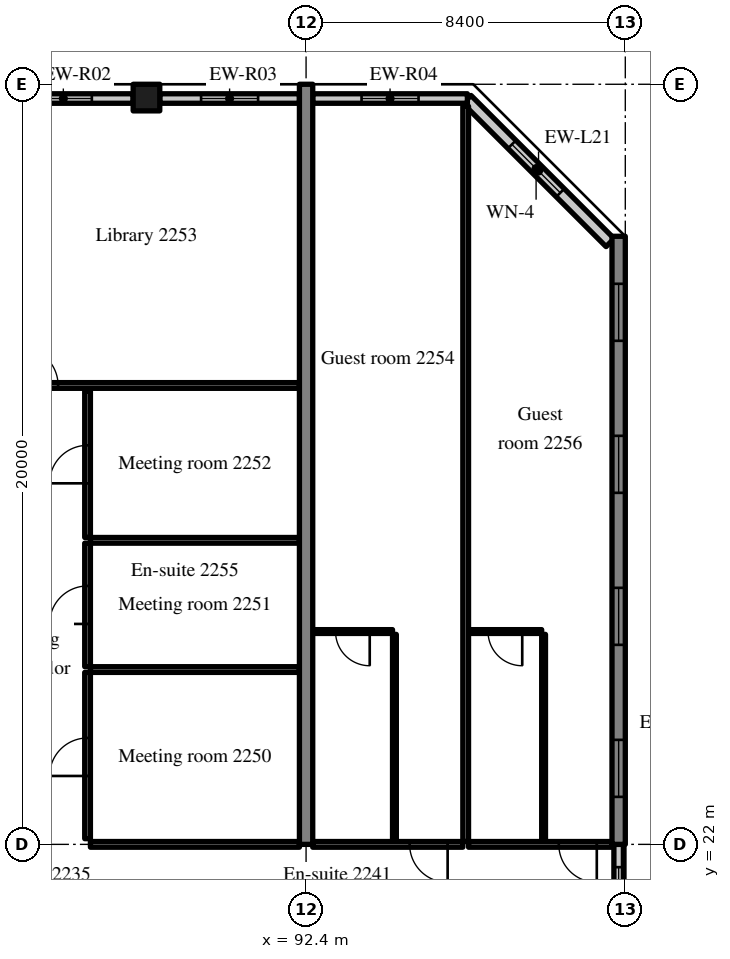
"""IFC4 building model, lengths in metres.
Left out: names, types, materials, properties, quantities, classifications, styles, units other than length and angle.
Written with IfcOpenShell. Run it as: python <this file> out.ifc"""

import sys

from ifc_helpers import new_model, si_unit, direction, frame, frame_2d, origin, origin_2d, place, context, subcontext, project, spatial, rectangle, extrude, source, transform, mapped, element, fill, save


model = new_model("IFC4")
c1 = context("Model", 3, precision=1e-05, world=origin(), true_north=direction((0.0, 1.0)))
c2 = subcontext(c1, "Body", "Model", "MODEL_VIEW")
j1 = project(units=[si_unit("LENGTHUNIT", "METRE"), si_unit("PLANEANGLEUNIT", "RADIAN")], contexts=[c1])
p1 = place(None, origin())
s1 = spatial("IfcSite", under=j1, at=p1, CompositionType="ELEMENT")
p2 = place(p1, origin())
s2 = spatial("IfcBuilding", under=s1, at=p2, CompositionType="ELEMENT")
p3 = place(p2, frame((0.0, 0.0, 95.2)))
s3 = spatial("IfcBuildingStorey", under=s2, at=p3, CompositionType="ELEMENT", Elevation=95.2)
m1 = source(origin(), c2, "Body", "SweptSolid", [
    extrude(rectangle(XDim=20.0, YDim=0.35, at=frame_2d((10.0, 0.0))), origin(), (0.0, 0.0, 1.0), 3.52),
])
p4 = place(p3, frame((92.4, 22.0, 0.0), z_axis=(0.0, 0.0, 1.0), x_axis=(0.0, 1.0, 0.0)))
e1 = element("IfcWall", 1, at=p4, inside=s3, PredefinedType="SHEAR", context=c2, shape_type="MappedRepresentation", body=[
    mapped(m1, transform((0.0, 0.0, 0.0), scale=1.0)),
])
m2 = source(origin(), c2, "Body", "SweptSolid", [
    extrude(rectangle(XDim=16.0, YDim=0.35, at=frame_2d((8.0, 0.0))), origin(), (0.0, 0.0, 1.0), 3.52),
])
p5 = place(p3, frame((100.625, 22.0, 0.0), z_axis=(0.0, 0.0, 1.0), x_axis=(0.0, 1.0, 0.0)))
e2 = element("IfcWall", 2, at=p5, inside=s3, PredefinedType="SHEAR", context=c2, shape_type="MappedRepresentation", body=[
    mapped(m2, transform((0.0, 0.0, 0.0), scale=1.0)),
])
m3 = source(origin(), c2, "Body", "SweptSolid", [
    extrude(rectangle(XDim=1.5, YDim=1.5, at=frame_2d((0.75, 0.75))), frame((0.0, 0.185, 0.0), z_axis=(0.0, -1.0, 0.0), x_axis=(1.0, 0.0, 0.0)), (0.0, 0.0, 1.0), 0.37),
])
p6 = place(p5, frame((1.25, 0.0, 0.9)))
e3 = element("IfcOpeningElement", 3, at=p6, cuts=e2, PredefinedType="OPENING", context=c2, shape_type="MappedRepresentation", body=[
    mapped(m3, transform((0.0, 0.0, 0.0), scale=1.0)),
])
p7 = place(p5, frame((5.25, 0.0, 0.9)))
e4 = element("IfcOpeningElement", 4, at=p7, cuts=e2, PredefinedType="OPENING", context=c2, shape_type="MappedRepresentation", body=[
    mapped(m3, transform((0.0, 0.0, 0.0), scale=1.0)),
])
p8 = place(p5, frame((9.25, 0.0, 0.9)))
e5 = element("IfcOpeningElement", 5, at=p8, cuts=e2, PredefinedType="OPENING", context=c2, shape_type="MappedRepresentation", body=[
    mapped(m3, transform((0.0, 0.0, 0.0), scale=1.0)),
])
p9 = place(p5, frame((13.25, 0.0, 0.9)))
e6 = element("IfcOpeningElement", 6, at=p9, cuts=e2, PredefinedType="OPENING", context=c2, shape_type="MappedRepresentation", body=[
    mapped(m3, transform((0.0, 0.0, 0.0), scale=1.0)),
])
m4 = source(origin(), c2, "Body", "SweptSolid", [
    extrude(rectangle(XDim=0.7, YDim=0.7, at=origin_2d()), origin(), (0.0, 0.0, 1.0), 3.52),
])
p10 = place(p3, frame((88.2, 41.65, 0.0), z_axis=(0.0, 0.0, 1.0), x_axis=(1.0, 0.0, 0.0)))
e7 = element("IfcColumn", 7, at=p10, inside=s3, PredefinedType="COLUMN", context=c2, shape_type="MappedRepresentation", body=[
    mapped(m4, transform((0.0, 0.0, 0.0), scale=1.0)),
])
m5 = source(origin(), c2, "Body", "SweptSolid", [
    extrude(rectangle(XDim=5.326, YDim=0.3, at=frame_2d((2.663, 0.0))), origin(), (0.0, 0.0, 1.0), 3.52),
])
p11 = place(p3, frame((100.4, 37.834, 0.0), z_axis=(0.0, 0.0, 1.0), x_axis=(-0.707083859269, 0.707129702361, 0.0)))
e8 = element("IfcWall", 8, at=p11, inside=s3, PredefinedType="SOLIDWALL", context=c2, shape_type="MappedRepresentation", body=[
    mapped(m5, transform((0.0, 0.0, 0.0), scale=1.0)),
])
m6 = source(origin(), c2, "Body", "SweptSolid", [
    extrude(rectangle(XDim=1.8, YDim=1.5, at=frame_2d((0.9, 0.75))), frame((0.0, 0.16, 0.0), z_axis=(0.0, -1.0, 0.0), x_axis=(1.0, 0.0, 0.0)), (0.0, 0.0, 1.0), 0.32),
])
p12 = place(p11, frame((1.854, 0.0, 0.9)))
e9 = element("IfcOpeningElement", 9, at=p12, cuts=e8, PredefinedType="OPENING", context=c2, shape_type="MappedRepresentation", body=[
    mapped(m6, transform((0.0, 0.0, 0.0), scale=1.0)),
])
m7 = source(origin(), c2, "Body", "SweptSolid", [
    extrude(rectangle(XDim=3.675, YDim=0.25, at=frame_2d((1.837, 0.0))), origin(), (0.0, 0.0, 1.0), 2.82),
])
p13 = place(p3, frame((87.85, 41.625, 0.0), z_axis=(0.0, 0.0, 1.0), x_axis=(-1.0, 0.0, 0.0)))
e10 = element("IfcWall", 10, at=p13, inside=s3, PredefinedType="SOLIDWALL", context=c2, shape_type="MappedRepresentation", body=[
    mapped(m7, transform((0.0, 0.0, 0.0), scale=1.0)),
])
m8 = source(origin(), c2, "Body", "SweptSolid", [
    extrude(rectangle(XDim=1.5, YDim=1.5, at=frame_2d((0.75, 0.75))), frame((0.0, 0.135, 0.0), z_axis=(0.0, -1.0, 0.0), x_axis=(1.0, 0.0, 0.0)), (0.0, 0.0, 1.0), 0.27),
])
p14 = place(p13, frame((1.087, 0.0, 0.9)))
e11 = element("IfcOpeningElement", 11, at=p14, cuts=e10, PredefinedType="OPENING", context=c2, shape_type="MappedRepresentation", body=[
    mapped(m8, transform((0.0, 0.0, 0.0), scale=1.0)),
])
p15 = place(p3, frame((92.225, 41.625, 0.0), z_axis=(0.0, 0.0, 1.0), x_axis=(-1.0, 0.0, 0.0)))
e12 = element("IfcWall", 12, at=p15, inside=s3, PredefinedType="SOLIDWALL", context=c2, shape_type="MappedRepresentation", body=[
    mapped(m7, transform((0.0, 0.0, 0.0), scale=1.0)),
])
p16 = place(p15, frame((1.087, 0.0, 0.9)))
e13 = element("IfcOpeningElement", 13, at=p16, cuts=e12, PredefinedType="OPENING", context=c2, shape_type="MappedRepresentation", body=[
    mapped(m8, transform((0.0, 0.0, 0.0), scale=1.0)),
])
m9 = source(origin(), c2, "Body", "SweptSolid", [
    extrude(rectangle(XDim=4.07, YDim=0.25, at=frame_2d((2.035, 0.0))), origin(), (0.0, 0.0, 1.0), 2.82),
])
p17 = place(p3, frame((96.645, 41.625, 0.0), z_axis=(0.0, 0.0, 1.0), x_axis=(-1.0, 0.0, 0.0)))
e14 = element("IfcWall", 14, at=p17, inside=s3, PredefinedType="SOLIDWALL", context=c2, shape_type="MappedRepresentation", body=[
    mapped(m9, transform((0.0, 0.0, 0.0), scale=1.0)),
])
p18 = place(p17, frame((1.285, 0.0, 0.9)))
e15 = element("IfcOpeningElement", 15, at=p18, cuts=e14, PredefinedType="OPENING", context=c2, shape_type="MappedRepresentation", body=[
    mapped(m8, transform((0.0, 0.0, 0.0), scale=1.0)),
])
m10 = source(origin(), c2, "Body", "SweptSolid", [
    extrude(rectangle(XDim=2.4, YDim=0.25, at=frame_2d((1.2, 0.0))), origin(), (0.0, 0.0, 1.0), 2.62),
])
p19 = place(p3, frame((100.625, 19.6, 0.0), z_axis=(0.0, 0.0, 1.0), x_axis=(0.0, 1.0, 0.0)))
e16 = element("IfcWall", 16, at=p19, inside=s3, PredefinedType="SOLIDWALL", context=c2, shape_type="MappedRepresentation", body=[
    mapped(m10, transform((0.0, 0.0, 0.0), scale=1.0)),
])
m11 = source(origin(), c2, "Body", "SweptSolid", [
    extrude(rectangle(XDim=1.2, YDim=1.5, at=frame_2d((0.6, 0.75))), frame((0.0, 0.135, 0.0), z_axis=(0.0, -1.0, 0.0), x_axis=(1.0, 0.0, 0.0)), (0.0, 0.0, 1.0), 0.27),
])
p20 = place(p19, frame((0.6, 0.0, 0.9)))
e17 = element("IfcOpeningElement", 17, at=p20, cuts=e16, PredefinedType="OPENING", context=c2, shape_type="MappedRepresentation", body=[
    mapped(m11, transform((0.0, 0.0, 0.0), scale=1.0)),
])
m12 = source(origin(), c2, "Body", "SweptSolid", [
    extrude(rectangle(XDim=5.5, YDim=0.15, at=frame_2d((2.75, 0.0))), origin(), (0.0, 0.0, 1.0), 2.82),
])
p21 = place(p3, frame((86.725, 22.0, 0.0), z_axis=(0.0, 0.0, 1.0), x_axis=(1.0, 0.0, 0.0)))
e18 = element("IfcWall", 18, at=p21, inside=s3, PredefinedType="PARTITIONING", context=c2, shape_type="MappedRepresentation", body=[
    mapped(m12, transform((0.0, 0.0, 0.0), scale=1.0)),
])
m13 = source(origin(), c2, "Body", "SweptSolid", [
    extrude(rectangle(XDim=4.375, YDim=0.15, at=frame_2d((2.188, 0.0))), origin(), (0.0, 0.0, 1.0), 3.52),
])
p22 = place(p3, frame((86.65, 22.15, 0.0), z_axis=(0.0, 0.0, 1.0), x_axis=(0.0, 1.0, 0.0)))
e19 = element("IfcWall", 19, at=p22, inside=s3, PredefinedType="PARTITIONING", context=c2, shape_type="MappedRepresentation", body=[
    mapped(m13, transform((0.0, 0.0, 0.0), scale=1.0)),
])
m14 = source(origin(), c2, "Body", "SweptSolid", [
    extrude(rectangle(XDim=1.0, YDim=2.1, at=frame_2d((0.5, 1.05))), frame((0.0, 0.085, 0.0), z_axis=(0.0, -1.0, 0.0), x_axis=(1.0, 0.0, 0.0)), (0.0, 0.0, 1.0), 0.17),
])
p23 = place(p22, frame((1.65, 0.0, 0.0)))
e20 = element("IfcOpeningElement", 20, at=p23, cuts=e19, PredefinedType="OPENING", context=c2, shape_type="MappedRepresentation", body=[
    mapped(m14, transform((0.0, 0.0, 0.0), scale=1.0)),
])
m15 = source(origin(), c2, "Body", "SweptSolid", [
    extrude(rectangle(XDim=5.5, YDim=0.15, at=frame_2d((2.75, 0.0))), origin(), (0.0, 0.0, 1.0), 3.52),
])
p24 = place(p3, frame((86.725, 26.6, 0.0), z_axis=(0.0, 0.0, 1.0), x_axis=(1.0, 0.0, 0.0)))
e21 = element("IfcWall", 21, at=p24, inside=s3, PredefinedType="PARTITIONING", context=c2, shape_type="MappedRepresentation", body=[
    mapped(m15, transform((0.0, 0.0, 0.0), scale=1.0)),
])
m16 = source(origin(), c2, "Body", "SweptSolid", [
    extrude(rectangle(XDim=3.25, YDim=0.15, at=frame_2d((1.625, 0.0))), origin(), (0.0, 0.0, 1.0), 3.52),
])
p25 = place(p3, frame((86.65, 26.675, 0.0), z_axis=(0.0, 0.0, 1.0), x_axis=(0.0, 1.0, 0.0)))
e22 = element("IfcWall", 22, at=p25, inside=s3, PredefinedType="PARTITIONING", context=c2, shape_type="MappedRepresentation", body=[
    mapped(m16, transform((0.0, 0.0, 0.0), scale=1.0)),
])
p26 = place(p25, frame((1.125, 0.0, 0.0)))
e23 = element("IfcOpeningElement", 23, at=p26, cuts=e22, PredefinedType="OPENING", context=c2, shape_type="MappedRepresentation", body=[
    mapped(m14, transform((0.0, 0.0, 0.0), scale=1.0)),
])
p27 = place(p3, frame((86.725, 30.0, 0.0), z_axis=(0.0, 0.0, 1.0), x_axis=(1.0, 0.0, 0.0)))
e24 = element("IfcWall", 24, at=p27, inside=s3, PredefinedType="PARTITIONING", context=c2, shape_type="MappedRepresentation", body=[
    mapped(m15, transform((0.0, 0.0, 0.0), scale=1.0)),
])
m17 = source(origin(), c2, "Body", "SweptSolid", [
    extrude(rectangle(XDim=3.85, YDim=0.15, at=frame_2d((1.925, 0.0))), origin(), (0.0, 0.0, 1.0), 3.52),
])
p28 = place(p3, frame((86.65, 30.075, 0.0), z_axis=(0.0, 0.0, 1.0), x_axis=(0.0, 1.0, 0.0)))
e25 = element("IfcWall", 25, at=p28, inside=s3, PredefinedType="PARTITIONING", context=c2, shape_type="MappedRepresentation", body=[
    mapped(m17, transform((0.0, 0.0, 0.0), scale=1.0)),
])
p29 = place(p28, frame((1.425, 0.0, 0.0)))
e26 = element("IfcOpeningElement", 26, at=p29, cuts=e25, PredefinedType="OPENING", context=c2, shape_type="MappedRepresentation", body=[
    mapped(m14, transform((0.0, 0.0, 0.0), scale=1.0)),
])
m18 = source(origin(), c2, "Body", "SweptSolid", [
    extrude(rectangle(XDim=8.05, YDim=0.15, at=frame_2d((4.025, 0.0))), origin(), (0.0, 0.0, 1.0), 3.52),
])
p30 = place(p3, frame((84.175, 34.075, 0.0), z_axis=(0.0, 0.0, 1.0), x_axis=(1.0, 0.0, 0.0)))
e27 = element("IfcWall", 27, at=p30, inside=s3, PredefinedType="PARTITIONING", context=c2, shape_type="MappedRepresentation", body=[
    mapped(m18, transform((0.0, 0.0, 0.0), scale=1.0)),
])
p31 = place(p30, frame((0.7, 0.0, 0.0)))
e28 = element("IfcOpeningElement", 28, at=p31, cuts=e27, PredefinedType="OPENING", context=c2, shape_type="MappedRepresentation", body=[
    mapped(m14, transform((0.0, 0.0, 0.0), scale=1.0)),
])
m19 = source(origin(), c2, "Body", "SweptSolid", [
    extrude(rectangle(XDim=5.45, YDim=0.1, at=frame_2d((2.725, 0.0))), origin(), (0.0, 0.0, 1.0), 3.52),
])
p32 = place(p3, frame((94.725, 22.075, 0.0), z_axis=(0.0, 0.0, 1.0), x_axis=(0.0, 1.0, 0.0)))
e29 = element("IfcWall", 29, at=p32, inside=s3, PredefinedType="PARTITIONING", context=c2, shape_type="MappedRepresentation", body=[
    mapped(m19, transform((0.0, 0.0, 0.0), scale=1.0)),
])
m20 = source(origin(), c2, "Body", "SweptSolid", [
    extrude(rectangle(XDim=2.1, YDim=0.1, at=frame_2d((1.05, 0.0))), origin(), (0.0, 0.0, 1.0), 3.52),
])
p33 = place(p3, frame((92.575, 27.6, 0.0), z_axis=(0.0, 0.0, 1.0), x_axis=(1.0, 0.0, 0.0)))
e30 = element("IfcWall", 30, at=p33, inside=s3, PredefinedType="PARTITIONING", context=c2, shape_type="MappedRepresentation", body=[
    mapped(m20, transform((0.0, 0.0, 0.0), scale=1.0)),
])
m21 = source(origin(), c2, "Body", "SweptSolid", [
    extrude(rectangle(XDim=0.9, YDim=2.1, at=frame_2d((0.45, 1.05))), frame((0.0, 0.06, 0.0), z_axis=(0.0, -1.0, 0.0), x_axis=(1.0, 0.0, 0.0)), (0.0, 0.0, 1.0), 0.12),
])
p34 = place(p33, frame((0.6, 0.0, 0.0)))
e31 = element("IfcOpeningElement", 31, at=p34, cuts=e30, PredefinedType="OPENING", context=c2, shape_type="MappedRepresentation", body=[
    mapped(m21, transform((0.0, 0.0, 0.0), scale=1.0)),
])
m22 = source(origin(), c2, "Body", "SweptSolid", [
    extrude(rectangle(XDim=3.95, YDim=0.15, at=frame_2d((1.975, 0.0))), origin(), (0.0, 0.0, 1.0), 2.82),
])
p35 = place(p3, frame((92.575, 22.0, 0.0), z_axis=(0.0, 0.0, 1.0), x_axis=(1.0, 0.0, 0.0)))
e32 = element("IfcWall", 32, at=p35, inside=s3, PredefinedType="PARTITIONING", context=c2, shape_type="MappedRepresentation", body=[
    mapped(m22, transform((0.0, 0.0, 0.0), scale=1.0)),
])
p36 = place(p35, frame((2.55, 0.0, 0.0)))
e33 = element("IfcOpeningElement", 33, at=p36, cuts=e32, PredefinedType="OPENING", context=c2, shape_type="MappedRepresentation", body=[
    mapped(m14, transform((0.0, 0.0, 0.0), scale=1.0)),
])
p37 = place(p3, frame((98.65, 22.075, 0.0), z_axis=(0.0, 0.0, 1.0), x_axis=(0.0, 1.0, 0.0)))
e34 = element("IfcWall", 34, at=p37, inside=s3, PredefinedType="PARTITIONING", context=c2, shape_type="MappedRepresentation", body=[
    mapped(m19, transform((0.0, 0.0, 0.0), scale=1.0)),
])
m23 = source(origin(), c2, "Body", "SweptSolid", [
    extrude(rectangle(XDim=1.925, YDim=0.1, at=frame_2d((0.962, 0.0))), origin(), (0.0, 0.0, 1.0), 3.52),
])
p38 = place(p3, frame((96.675, 27.6, 0.0), z_axis=(0.0, 0.0, 1.0), x_axis=(1.0, 0.0, 0.0)))
e35 = element("IfcWall", 35, at=p38, inside=s3, PredefinedType="PARTITIONING", context=c2, shape_type="MappedRepresentation", body=[
    mapped(m23, transform((0.0, 0.0, 0.0), scale=1.0)),
])
p39 = place(p38, frame((0.513, 0.0, 0.0)))
e36 = element("IfcOpeningElement", 36, at=p39, cuts=e35, PredefinedType="OPENING", context=c2, shape_type="MappedRepresentation", body=[
    mapped(m21, transform((0.0, 0.0, 0.0), scale=1.0)),
])
m24 = source(origin(), c2, "Body", "SweptSolid", [
    extrude(rectangle(XDim=3.775, YDim=0.15, at=frame_2d((1.887, 0.0))), origin(), (0.0, 0.0, 1.0), 2.82),
])
p40 = place(p3, frame((96.675, 22.0, 0.0), z_axis=(0.0, 0.0, 1.0), x_axis=(1.0, 0.0, 0.0)))
e37 = element("IfcWall", 37, at=p40, inside=s3, PredefinedType="PARTITIONING", context=c2, shape_type="MappedRepresentation", body=[
    mapped(m24, transform((0.0, 0.0, 0.0), scale=1.0)),
])
p41 = place(p40, frame((2.375, 0.0, 0.0)))
e38 = element("IfcOpeningElement", 38, at=p41, cuts=e37, PredefinedType="OPENING", context=c2, shape_type="MappedRepresentation", body=[
    mapped(m14, transform((0.0, 0.0, 0.0), scale=1.0)),
])
m25 = source(origin(), c2, "Body", "SweptSolid", [
    extrude(rectangle(XDim=19.347, YDim=0.15, at=frame_2d((9.674, 0.0))), origin(), (0.0, 0.0, 1.0), 3.52),
])
p42 = place(p3, frame((96.6, 22.075, 0.0), z_axis=(0.0, 0.0, 1.0), x_axis=(0.0, 1.0, 0.0)))
e39 = element("IfcWall", 39, at=p42, inside=s3, PredefinedType="PARTITIONING", context=c2, shape_type="MappedRepresentation", body=[
    mapped(m25, transform((0.0, 0.0, 0.0), scale=1.0)),
])
m26 = source(origin(), c2, "Body", "SweptSolid", [
    extrude(rectangle(XDim=1.8, YDim=1.5, at=frame_2d((0.9, 0.75))), frame((0.0, 0.03, 0.0), z_axis=(0.0, -1.0, 0.0), x_axis=(1.0, 0.0, 0.0)), (0.0, 0.0, 1.0), 0.06),
])
p43 = place(p12, origin())
e40 = element("IfcWindow", 40, at=p43, inside=s3, PartitioningType="SINGLE_PANEL", PredefinedType="WINDOW", context=c2, shape_type="MappedRepresentation", body=[
    mapped(m26, transform((0.0, 0.0, 0.0), scale=1.0)),
])
fill(e9, e40)
m27 = source(origin(), c2, "Body", "SweptSolid", [
    extrude(rectangle(XDim=1.5, YDim=1.5, at=frame_2d((0.75, 0.75))), frame((0.0, 0.03, 0.0), z_axis=(0.0, -1.0, 0.0), x_axis=(1.0, 0.0, 0.0)), (0.0, 0.0, 1.0), 0.06),
])
p44 = place(p14, origin())
e41 = element("IfcWindow", 41, at=p44, inside=s3, PartitioningType="SINGLE_PANEL", PredefinedType="WINDOW", context=c2, shape_type="MappedRepresentation", body=[
    mapped(m27, transform((0.0, 0.0, 0.0), scale=1.0)),
])
fill(e11, e41)
p45 = place(p16, origin())
e42 = element("IfcWindow", 42, at=p45, inside=s3, PartitioningType="SINGLE_PANEL", PredefinedType="WINDOW", context=c2, shape_type="MappedRepresentation", body=[
    mapped(m27, transform((0.0, 0.0, 0.0), scale=1.0)),
])
fill(e13, e42)
p46 = place(p18, origin())
e43 = element("IfcWindow", 43, at=p46, inside=s3, PartitioningType="SINGLE_PANEL", PredefinedType="WINDOW", context=c2, shape_type="MappedRepresentation", body=[
    mapped(m27, transform((0.0, 0.0, 0.0), scale=1.0)),
])
fill(e15, e43)
p47 = place(p6, origin())
e44 = element("IfcWindow", 44, at=p47, inside=s3, PartitioningType="SINGLE_PANEL", PredefinedType="WINDOW", context=c2, shape_type="MappedRepresentation", body=[
    mapped(m27, transform((0.0, 0.0, 0.0), scale=1.0)),
])
fill(e3, e44)
p48 = place(p7, origin())
e45 = element("IfcWindow", 45, at=p48, inside=s3, PartitioningType="SINGLE_PANEL", PredefinedType="WINDOW", context=c2, shape_type="MappedRepresentation", body=[
    mapped(m27, transform((0.0, 0.0, 0.0), scale=1.0)),
])
fill(e4, e45)
p49 = place(p8, origin())
e46 = element("IfcWindow", 46, at=p49, inside=s3, PartitioningType="SINGLE_PANEL", PredefinedType="WINDOW", context=c2, shape_type="MappedRepresentation", body=[
    mapped(m27, transform((0.0, 0.0, 0.0), scale=1.0)),
])
fill(e5, e46)
p50 = place(p9, origin())
e47 = element("IfcWindow", 47, at=p50, inside=s3, PartitioningType="SINGLE_PANEL", PredefinedType="WINDOW", context=c2, shape_type="MappedRepresentation", body=[
    mapped(m27, transform((0.0, 0.0, 0.0), scale=1.0)),
])
fill(e6, e47)
m28 = source(origin(), c2, "Body", "SweptSolid", [
    extrude(rectangle(XDim=1.2, YDim=1.5, at=frame_2d((0.6, 0.75))), frame((0.0, 0.03, 0.0), z_axis=(0.0, -1.0, 0.0), x_axis=(1.0, 0.0, 0.0)), (0.0, 0.0, 1.0), 0.06),
])
p51 = place(p20, origin())
e48 = element("IfcWindow", 48, at=p51, inside=s3, PartitioningType="SINGLE_PANEL", PredefinedType="WINDOW", context=c2, shape_type="MappedRepresentation", body=[
    mapped(m28, transform((0.0, 0.0, 0.0), scale=1.0)),
])
fill(e17, e48)
m29 = source(origin(), c2, "Body", "SweptSolid", [
    extrude(rectangle(XDim=1.0, YDim=2.1, at=frame_2d((0.5, 1.05))), frame((0.0, 0.025, 0.0), z_axis=(0.0, -1.0, 0.0), x_axis=(1.0, 0.0, 0.0)), (0.0, 0.0, 1.0), 0.05),
])
p52 = place(p23, origin())
e49 = element("IfcDoor", 49, at=p52, inside=s3, OperationType="SINGLE_SWING_LEFT", PredefinedType="DOOR", context=c2, shape_type="MappedRepresentation", body=[
    mapped(m29, transform((0.0, 0.0, 0.0), scale=1.0)),
])
fill(e20, e49)
p53 = place(p26, origin())
e50 = element("IfcDoor", 50, at=p53, inside=s3, OperationType="SINGLE_SWING_LEFT", PredefinedType="DOOR", context=c2, shape_type="MappedRepresentation", body=[
    mapped(m29, transform((0.0, 0.0, 0.0), scale=1.0)),
])
fill(e23, e50)
p54 = place(p29, origin())
e51 = element("IfcDoor", 51, at=p54, inside=s3, OperationType="SINGLE_SWING_LEFT", PredefinedType="DOOR", context=c2, shape_type="MappedRepresentation", body=[
    mapped(m29, transform((0.0, 0.0, 0.0), scale=1.0)),
])
fill(e26, e51)
p55 = place(p31, origin())
e52 = element("IfcDoor", 52, at=p55, inside=s3, OperationType="SINGLE_SWING_LEFT", PredefinedType="DOOR", context=c2, shape_type="MappedRepresentation", body=[
    mapped(m29, transform((0.0, 0.0, 0.0), scale=1.0)),
])
fill(e28, e52)
m30 = source(origin(), c2, "Body", "SweptSolid", [
    extrude(rectangle(XDim=0.9, YDim=2.1, at=frame_2d((0.45, 1.05))), frame((0.0, 0.025, 0.0), z_axis=(0.0, -1.0, 0.0), x_axis=(1.0, 0.0, 0.0)), (0.0, 0.0, 1.0), 0.05),
])
p56 = place(p34, origin())
e53 = element("IfcDoor", 53, at=p56, inside=s3, OperationType="SINGLE_SWING_RIGHT", PredefinedType="DOOR", context=c2, shape_type="MappedRepresentation", body=[
    mapped(m30, transform((0.0, 0.0, 0.0), scale=1.0)),
])
fill(e31, e53)
p57 = place(p36, origin())
e54 = element("IfcDoor", 54, at=p57, inside=s3, OperationType="SINGLE_SWING_RIGHT", PredefinedType="DOOR", context=c2, shape_type="MappedRepresentation", body=[
    mapped(m29, transform((0.0, 0.0, 0.0), scale=1.0)),
])
fill(e33, e54)
p58 = place(p39, origin())
e55 = element("IfcDoor", 55, at=p58, inside=s3, OperationType="SINGLE_SWING_RIGHT", PredefinedType="DOOR", context=c2, shape_type="MappedRepresentation", body=[
    mapped(m30, transform((0.0, 0.0, 0.0), scale=1.0)),
])
fill(e36, e55)
p59 = place(p41, origin())
e56 = element("IfcDoor", 56, at=p59, inside=s3, OperationType="SINGLE_SWING_RIGHT", PredefinedType="DOOR", context=c2, shape_type="MappedRepresentation", body=[
    mapped(m29, transform((0.0, 0.0, 0.0), scale=1.0)),
])
fill(e38, e56)
save(model, sys.argv[1])
